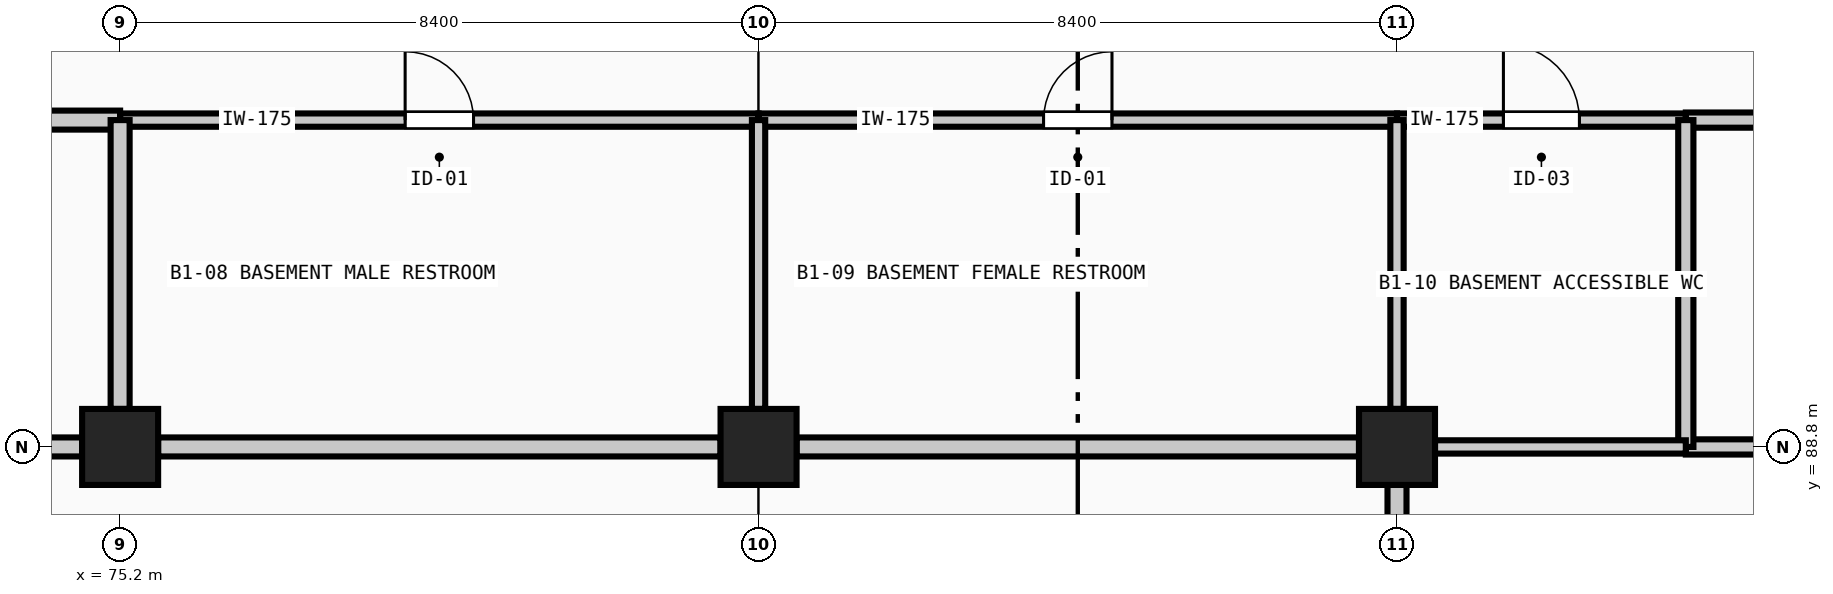
"""IFC4 building model, lengths in metres.
Left out: names, types, materials, properties, quantities, classifications, styles, units other than length and angle.
Written with IfcOpenShell. Run it as: python <this file> out.ifc"""

import sys

from ifc_helpers import new_model, si_unit, direction, frame, frame_2d, origin, origin_2d, place, context, subcontext, project, spatial, rectangle, extrude, element, fill, save


model = new_model("IFC4")
c1 = context("Model", 3, precision=1e-05, world=origin(), true_north=direction((0.0, 1.0)))
c2 = subcontext(c1, "Body", "Model", "MODEL_VIEW")
j1 = project(units=[si_unit("LENGTHUNIT", "METRE"), si_unit("PLANEANGLEUNIT", "RADIAN")], contexts=[c1])
p1 = place(None, origin())
s1 = spatial("IfcSite", under=j1, at=p1, CompositionType="ELEMENT")
p2 = place(p1, origin())
s2 = spatial("IfcBuilding", under=s1, at=p2, CompositionType="ELEMENT")
p3 = place(p2, frame((0.0, 0.0, -4.8)))
s3 = spatial("IfcBuildingStorey", under=s2, at=p3, CompositionType="ELEMENT", Elevation=-4.8)
for number, where, z_axis, x_axis in (
    (1, (75.2, 88.8, 0.0), (0.0, 0.0, 1.0), (1.0, 0.0, 0.0)),
    (2, (83.6, 88.8, 0.0), (0.0, 0.0, 1.0), (1.0, 0.0, 0.0)),
    (3, (92.0, 88.8, 0.0), (0.0, 0.0, 1.0), (1.0, 0.0, 0.0)),
):
    element("IfcColumn", number, at=place(p3, frame(where, z_axis=z_axis, x_axis=x_axis)), inside=s3, PredefinedType="COLUMN", context=c2, shape_type="SweptSolid", body=[
        extrude(rectangle(XDim=1.0, YDim=1.0, at=origin_2d()), origin(), (0.0, 0.0, 1.0), 4.8),
    ])
p4 = place(p3, frame((92.0, 88.3, 0.0), z_axis=(0.0, 0.0, 1.0), x_axis=(0.0, -1.0, 0.0)))
e4 = element("IfcWall", 4, at=p4, inside=s3, PredefinedType="SOLIDWALL", context=c2, shape_type="SweptSolid", body=[
    extrude(rectangle(XDim=6.25, YDim=0.25, at=frame_2d((3.125, 0.0))), origin(), (0.0, 0.0, 1.0), 4.05),
])
p5 = place(p3, frame((66.8, 93.1, 0.0), z_axis=(0.0, 0.0, 1.0), x_axis=(1.0, 0.0, 0.0)))
e5 = element("IfcWall", 5, at=p5, inside=s3, PredefinedType="SOLIDWALL", context=c2, shape_type="SweptSolid", body=[
    extrude(rectangle(XDim=8.4, YDim=0.25, at=frame_2d((4.2, 0.0))), origin(), (0.0, 0.0, 1.0), 4.5),
])
p6 = place(p3, frame((95.8, 93.1, 0.0), z_axis=(0.0, 0.0, 1.0), x_axis=(1.0, 0.0, 0.0)))
e6 = element("IfcWall", 6, at=p6, inside=s3, PredefinedType="PARTITIONING", context=c2, shape_type="SweptSolid", body=[
    extrude(rectangle(XDim=4.6, YDim=0.2, at=frame_2d((2.3, 0.0))), origin(), (0.0, 0.0, 1.0), 4.5),
])
p7 = place(p3, frame((75.2, 93.1, 0.0), z_axis=(0.0, 0.0, 1.0), x_axis=(1.0, 0.0, 0.0)))
e7 = element("IfcWall", 7, at=p7, inside=s3, PredefinedType="PLUMBINGWALL", context=c2, shape_type="SweptSolid", body=[
    extrude(rectangle(XDim=8.4, YDim=0.175, at=frame_2d((4.2, 0.0))), origin(), (0.0, 0.0, 1.0), 4.5),
])
p8 = place(p7, frame((3.75, 0.0, 0.0)))
e8 = element("IfcOpeningElement", 8, at=p8, cuts=e7, PredefinedType="OPENING", context=c2, shape_type="SweptSolid", body=[
    extrude(rectangle(XDim=0.9, YDim=2.1, at=frame_2d((0.45, 1.05))), frame((0.0, 0.097, 0.0), z_axis=(0.0, -1.0, 0.0), x_axis=(1.0, 0.0, 0.0)), (0.0, 0.0, 1.0), 0.195),
])
p9 = place(p3, frame((83.6, 93.1, 0.0), z_axis=(0.0, 0.0, 1.0), x_axis=(1.0, 0.0, 0.0)))
e9 = element("IfcWall", 9, at=p9, inside=s3, PredefinedType="PLUMBINGWALL", context=c2, shape_type="SweptSolid", body=[
    extrude(rectangle(XDim=8.4, YDim=0.175, at=frame_2d((4.2, 0.0))), origin(), (0.0, 0.0, 1.0), 4.5),
])
p10 = place(p9, frame((3.75, 0.0, 0.0)))
e10 = element("IfcOpeningElement", 10, at=p10, cuts=e9, PredefinedType="OPENING", context=c2, shape_type="SweptSolid", body=[
    extrude(rectangle(XDim=0.9, YDim=2.1, at=frame_2d((0.45, 1.05))), frame((0.0, 0.097, 0.0), z_axis=(0.0, -1.0, 0.0), x_axis=(1.0, 0.0, 0.0)), (0.0, 0.0, 1.0), 0.195),
])
p11 = place(p3, frame((92.0, 93.1, 0.0), z_axis=(0.0, 0.0, 1.0), x_axis=(1.0, 0.0, 0.0)))
e11 = element("IfcWall", 11, at=p11, inside=s3, PredefinedType="PLUMBINGWALL", context=c2, shape_type="SweptSolid", body=[
    extrude(rectangle(XDim=3.8, YDim=0.175, at=frame_2d((1.9, 0.0))), origin(), (0.0, 0.0, 1.0), 4.5),
])
p12 = place(p11, frame((1.4, 0.0, 0.0)))
e12 = element("IfcOpeningElement", 12, at=p12, cuts=e11, PredefinedType="OPENING", context=c2, shape_type="SweptSolid", body=[
    extrude(rectangle(XDim=1.0, YDim=2.15, at=frame_2d((0.5, 1.075))), frame((0.0, 0.097, 0.0), z_axis=(0.0, -1.0, 0.0), x_axis=(1.0, 0.0, 0.0)), (0.0, 0.0, 1.0), 0.195),
])
p13 = place(p3, frame((67.3, 88.8, 0.0), z_axis=(0.0, 0.0, 1.0), x_axis=(1.0, 0.0, 0.0)))
e13 = element("IfcWall", 13, at=p13, inside=s3, PredefinedType="SOLIDWALL", context=c2, shape_type="SweptSolid", body=[
    extrude(rectangle(XDim=7.4, YDim=0.25, at=frame_2d((3.7, 0.0))), origin(), (0.0, 0.0, 1.0), 3.75),
])
p14 = place(p3, frame((75.7, 88.8, 0.0), z_axis=(0.0, 0.0, 1.0), x_axis=(1.0, 0.0, 0.0)))
e14 = element("IfcWall", 14, at=p14, inside=s3, PredefinedType="SOLIDWALL", context=c2, shape_type="SweptSolid", body=[
    extrude(rectangle(XDim=7.4, YDim=0.25, at=frame_2d((3.7, 0.0))), origin(), (0.0, 0.0, 1.0), 3.75),
])
p15 = place(p3, frame((84.1, 88.8, 0.0), z_axis=(0.0, 0.0, 1.0), x_axis=(1.0, 0.0, 0.0)))
e15 = element("IfcWall", 15, at=p15, inside=s3, PredefinedType="SOLIDWALL", context=c2, shape_type="SweptSolid", body=[
    extrude(rectangle(XDim=7.4, YDim=0.25, at=frame_2d((3.7, 0.0))), origin(), (0.0, 0.0, 1.0), 3.75),
])
p16 = place(p3, frame((75.2, 93.1, 0.0), z_axis=(0.0, 0.0, 1.0), x_axis=(0.0, -1.0, 0.0)))
e16 = element("IfcWall", 16, at=p16, inside=s3, PredefinedType="SOLIDWALL", context=c2, shape_type="SweptSolid", body=[
    extrude(rectangle(XDim=3.8, YDim=0.25, at=frame_2d((1.9, 0.0))), origin(), (0.0, 0.0, 1.0), 3.85),
])
p17 = place(p3, frame((99.9, 88.8, 0.0), z_axis=(0.0, 0.0, 1.0), x_axis=(-1.0, 0.0, 0.0)))
e17 = element("IfcWall", 17, at=p17, inside=s3, PredefinedType="PARTITIONING", context=c2, shape_type="SweptSolid", body=[
    extrude(rectangle(XDim=4.1, YDim=0.2, at=frame_2d((2.05, 0.0))), origin(), (0.0, 0.0, 1.0), 3.75),
])
p18 = place(p3, frame((95.8, 88.8, 0.0), z_axis=(0.0, 0.0, 1.0), x_axis=(0.0, 1.0, 0.0)))
e18 = element("IfcWall", 18, at=p18, inside=s3, PredefinedType="PARTITIONING", context=c2, shape_type="SweptSolid", body=[
    extrude(rectangle(XDim=4.3, YDim=0.2, at=frame_2d((2.15, 0.0))), origin(), (0.0, 0.0, 1.0), 4.5),
])
for number, where, z_axis, x_axis in (
    (19, (83.6, 93.1, 0.0), (0.0, 0.0, 1.0), (0.0, -1.0, 0.0)),
    (20, (92.0, 93.1, 0.0), (0.0, 0.0, 1.0), (0.0, -1.0, 0.0)),
):
    element("IfcWall", number, at=place(p3, frame(where, z_axis=z_axis, x_axis=x_axis)), inside=s3, PredefinedType="PLUMBINGWALL", context=c2, shape_type="SweptSolid", body=[
        extrude(rectangle(XDim=3.8, YDim=0.175, at=frame_2d((1.9, 0.0))), origin(), (0.0, 0.0, 1.0), 3.85),
    ])
p19 = place(p3, frame((95.8, 88.8, 0.0), z_axis=(0.0, 0.0, 1.0), x_axis=(-1.0, 0.0, 0.0)))
e21 = element("IfcWall", 21, at=p19, inside=s3, PredefinedType="PLUMBINGWALL", context=c2, shape_type="SweptSolid", body=[
    extrude(rectangle(XDim=3.3, YDim=0.175, at=frame_2d((1.65, 0.0))), origin(), (0.0, 0.0, 1.0), 3.75),
])
p20 = place(p8, origin())
e22 = element("IfcDoor", 22, at=p20, inside=s3, OperationType="SINGLE_SWING_LEFT", PredefinedType="DOOR", context=c2, shape_type="SweptSolid", body=[
    extrude(rectangle(XDim=0.9, YDim=2.1, at=frame_2d((0.45, 1.05))), frame((0.0, 0.025, 0.0), z_axis=(0.0, -1.0, 0.0), x_axis=(1.0, 0.0, 0.0)), (0.0, 0.0, 1.0), 0.05),
])
fill(e8, e22)
p21 = place(p10, origin())
e23 = element("IfcDoor", 23, at=p21, inside=s3, OperationType="SINGLE_SWING_RIGHT", PredefinedType="DOOR", context=c2, shape_type="SweptSolid", body=[
    extrude(rectangle(XDim=0.9, YDim=2.1, at=frame_2d((0.45, 1.05))), frame((0.0, 0.025, 0.0), z_axis=(0.0, -1.0, 0.0), x_axis=(1.0, 0.0, 0.0)), (0.0, 0.0, 1.0), 0.05),
])
fill(e10, e23)
p22 = place(p12, origin())
e24 = element("IfcDoor", 24, at=p22, inside=s3, OperationType="SINGLE_SWING_LEFT", PredefinedType="DOOR", context=c2, shape_type="SweptSolid", body=[
    extrude(rectangle(XDim=1.0, YDim=2.15, at=frame_2d((0.5, 1.075))), frame((0.0, 0.025, 0.0), z_axis=(0.0, -1.0, 0.0), x_axis=(1.0, 0.0, 0.0)), (0.0, 0.0, 1.0), 0.05),
])
fill(e12, e24)
save(model, sys.argv[1])
